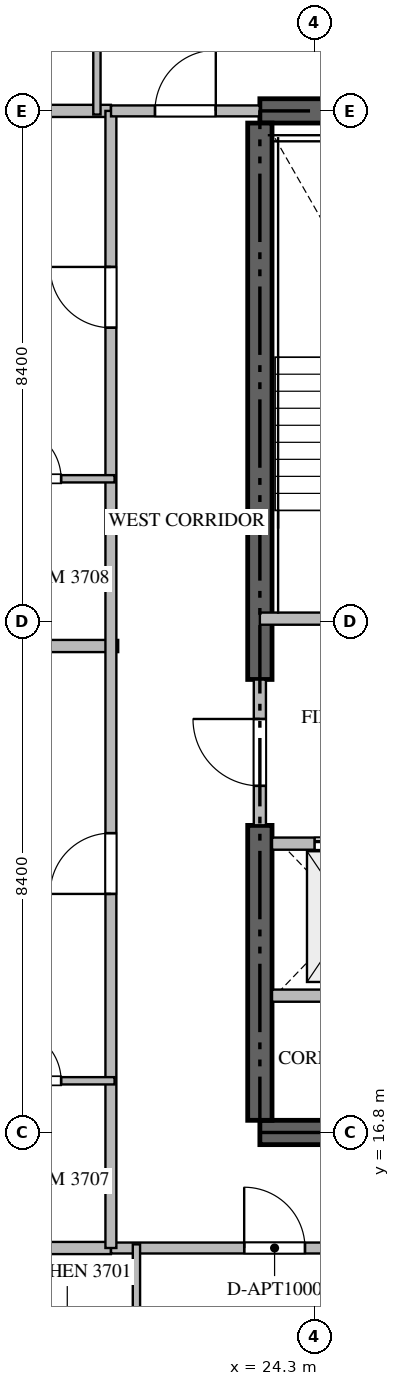
"""IFC4 building model, lengths in metres.
Left out: names, types, materials, properties, quantities, classifications, styles, units other than length and angle.
Written with IfcOpenShell. Run it as: python <this file> out.ifc"""

import sys

from ifc_helpers import new_model, si_unit, direction, frame, frame_2d, origin, place, context, subcontext, project, spatial, rectangle, extrude, source, transform, mapped, element, fill, save


model = new_model("IFC4")
c1 = context("Model", 3, precision=1e-05, world=origin(), true_north=direction((0.0, 1.0)))
c2 = subcontext(c1, "Body", "Model", "MODEL_VIEW")
j1 = project(units=[si_unit("LENGTHUNIT", "METRE"), si_unit("PLANEANGLEUNIT", "RADIAN")], contexts=[c1])
p1 = place(None, origin())
s1 = spatial("IfcSite", under=j1, at=p1, CompositionType="ELEMENT")
p2 = place(p1, origin())
s2 = spatial("IfcBuilding", under=s1, at=p2, CompositionType="ELEMENT")
p3 = place(p2, frame((0.0, 0.0, 150.15)))
s3 = spatial("IfcBuildingStorey", under=s2, at=p3, CompositionType="ELEMENT", Elevation=150.15)
for number, where, z_axis, x_axis in (
    (1, (23.4, 16.8, -0.26), (0.0, 0.0, 1.0), (1.0, 0.0, 0.0)),
    (2, (41.4, 33.6, -0.26), (0.0, 0.0, 1.0), (-1.0, 0.0, 0.0)),
):
    element("IfcWall", number, at=place(p3, frame(where, z_axis=z_axis, x_axis=x_axis)), inside=s3, PredefinedType="SHEAR", context=c2, shape_type="SweptSolid", body=[
        extrude(rectangle(XDim=18.0, YDim=0.4, at=frame_2d((9.0, 0.0))), origin(), (0.0, 0.0, 1.0), 3.748),
    ])
p4 = place(p3, frame((23.4, 17.0, -0.26), z_axis=(0.0, 0.0, 1.0), x_axis=(0.0, 1.0, 0.0)))
e3 = element("IfcWall", 3, at=p4, inside=s3, PredefinedType="SHEAR", context=c2, shape_type="SweptSolid", body=[
    extrude(rectangle(XDim=4.85, YDim=0.4, at=frame_2d((2.425, 0.0))), origin(), (0.0, 0.0, 1.0), 3.748),
])
p5 = place(p3, frame((23.4, 24.25, -0.26), z_axis=(0.0, 0.0, 1.0), x_axis=(0.0, 1.0, 0.0)))
e4 = element("IfcWall", 4, at=p5, inside=s3, PredefinedType="SHEAR", context=c2, shape_type="SweptSolid", body=[
    extrude(rectangle(XDim=9.15, YDim=0.4, at=frame_2d((4.575, 0.0))), origin(), (0.0, 0.0, 1.0), 3.748),
])
p6 = place(p3, frame((23.4, 25.25, 0.0), z_axis=(0.0, 0.0, 1.0), x_axis=(1.0, 0.0, 0.0)))
e5 = element("IfcWall", 5, at=p6, inside=s3, PredefinedType="STANDARD", context=c2, shape_type="SweptSolid", body=[
    extrude(rectangle(XDim=4.45, YDim=0.2, at=frame_2d((2.225, 0.0))), origin(), (0.0, 0.0, 1.0), 3.49),
])
p7 = place(p6, frame((1.65, 0.0, 0.0)))
e6 = element("IfcOpeningElement", 6, at=p7, cuts=e5, PredefinedType="OPENING", context=c2, shape_type="SweptSolid", body=[
    extrude(rectangle(XDim=1.1, YDim=2.15, at=frame_2d((0.55, 1.075))), frame((0.0, 0.11, 0.0), z_axis=(0.0, -1.0, 0.0), x_axis=(1.0, 0.0, 0.0)), (0.0, 0.0, 1.0), 0.22),
])
p8 = place(p3, frame((23.6, 21.55, 0.0), z_axis=(0.0, 0.0, 1.0), x_axis=(1.0, 0.0, 0.0)))
e7 = element("IfcWall", 7, at=p8, inside=s3, PredefinedType="STANDARD", context=c2, shape_type="SweptSolid", body=[
    extrude(rectangle(XDim=2.45, YDim=0.2, at=frame_2d((1.225, 0.0))), origin(), (0.0, 0.0, 1.0), 3.49),
])
p9 = place(p8, frame((0.7, 0.0, 0.0)))
e8 = element("IfcOpeningElement", 8, at=p9, cuts=e7, PredefinedType="OPENING", context=c2, shape_type="SweptSolid", body=[
    extrude(rectangle(XDim=1.2, YDim=2.2, at=frame_2d((0.6, 1.1))), frame((0.0, 0.11, 0.0), z_axis=(0.0, -1.0, 0.0), x_axis=(1.0, 0.0, 0.0)), (0.0, 0.0, 1.0), 0.22),
])
p10 = place(p3, frame((23.6, 19.05, 0.0), z_axis=(0.0, 0.0, 1.0), x_axis=(1.0, 0.0, 0.0)))
e9 = element("IfcWall", 9, at=p10, inside=s3, PredefinedType="STANDARD", context=c2, shape_type="SweptSolid", body=[
    extrude(rectangle(XDim=2.45, YDim=0.2, at=frame_2d((1.225, 0.0))), origin(), (0.0, 0.0, 1.0), 3.49),
])
p11 = place(p3, frame((23.4, 21.852, 0.0), z_axis=(0.0, 0.0, 1.0), x_axis=(0.0, 1.0, 0.0)))
e10 = element("IfcWall", 10, at=p11, inside=s3, PredefinedType="STANDARD", context=c2, shape_type="SweptSolid", body=[
    extrude(rectangle(XDim=2.396, YDim=0.2, at=frame_2d((1.198, 0.0))), origin(), (0.0, 0.0, 1.0), 3.49),
])
p12 = place(p11, frame((0.648, 0.0, 0.0)))
e11 = element("IfcOpeningElement", 11, at=p12, cuts=e10, PredefinedType="OPENING", context=c2, shape_type="SweptSolid", body=[
    extrude(rectangle(XDim=1.1, YDim=2.15, at=frame_2d((0.55, 1.075))), frame((0.0, 0.11, 0.0), z_axis=(0.0, -1.0, 0.0), x_axis=(1.0, 0.0, 0.0)), (0.0, 0.0, 1.0), 0.22),
])
p13 = place(p3, frame((7.882, 24.8, 0.0), z_axis=(0.0, 0.0, 1.0), x_axis=(1.0, 0.0, 0.0)))
e12 = element("IfcWall", 12, at=p13, inside=s3, PredefinedType="PARTITIONING", context=c2, shape_type="SweptSolid", body=[
    extrude(rectangle(XDim=13.188, YDim=0.2, at=frame_2d((6.594, 0.0))), origin(), (0.0, 0.0, 1.0), 3.49),
])
for number, where, z_axis, x_axis in (
    (13, (7.882, 14.9, 0.0), (0.0, 0.0, 1.0), (1.0, 0.0, 0.0)),
    (14, (7.882, 33.6, 0.0), (0.0, 0.0, 1.0), (1.0, 0.0, 0.0)),
):
    element("IfcWall", number, at=place(p3, frame(where, z_axis=z_axis, x_axis=x_axis)), inside=s3, PredefinedType="PARTITIONING", context=c2, shape_type="SweptSolid", body=[
        extrude(rectangle(XDim=13.068, YDim=0.2, at=frame_2d((6.534, 0.0))), origin(), (0.0, 0.0, 1.0), 3.49),
    ])
p14 = place(p3, frame((20.952, 14.9, 0.0), z_axis=(0.0, 0.0, 1.0), x_axis=(1.0, 0.0, 0.0)))
e15 = element("IfcWall", 15, at=p14, inside=s3, PredefinedType="PARTITIONING", context=c2, shape_type="SweptSolid", body=[
    extrude(rectangle(XDim=22.896, YDim=0.18, at=frame_2d((11.448, 0.0))), origin(), (0.0, 0.0, 1.0), 3.49),
])
p15 = place(p14, frame((2.19, 0.0, 0.0)))
e16 = element("IfcOpeningElement", 16, at=p15, cuts=e15, PredefinedType="OPENING", context=c2, shape_type="SweptSolid", body=[
    extrude(rectangle(XDim=1.0, YDim=2.15, at=frame_2d((0.5, 1.075))), frame((0.0, 0.1, 0.0), z_axis=(0.0, -1.0, 0.0), x_axis=(1.0, 0.0, 0.0)), (0.0, 0.0, 1.0), 0.2),
])
p16 = place(p14, frame((5.802, 0.0, 0.0)))
e17 = element("IfcOpeningElement", 17, at=p16, cuts=e15, PredefinedType="OPENING", context=c2, shape_type="SweptSolid", body=[
    extrude(rectangle(XDim=1.0, YDim=2.15, at=frame_2d((0.5, 1.075))), frame((0.0, 0.1, 0.0), z_axis=(0.0, -1.0, 0.0), x_axis=(1.0, 0.0, 0.0)), (0.0, 0.0, 1.0), 0.2),
])
p17 = place(p14, frame((12.196, 0.0, 0.0)))
e18 = element("IfcOpeningElement", 18, at=p17, cuts=e15, PredefinedType="OPENING", context=c2, shape_type="SweptSolid", body=[
    extrude(rectangle(XDim=1.0, YDim=2.15, at=frame_2d((0.5, 1.075))), frame((0.0, 0.1, 0.0), z_axis=(0.0, -1.0, 0.0), x_axis=(1.0, 0.0, 0.0)), (0.0, 0.0, 1.0), 0.2),
])
p18 = place(p14, frame((19.706, 0.0, 0.0)))
e19 = element("IfcOpeningElement", 19, at=p18, cuts=e15, PredefinedType="OPENING", context=c2, shape_type="SweptSolid", body=[
    extrude(rectangle(XDim=1.0, YDim=2.15, at=frame_2d((0.5, 1.075))), frame((0.0, 0.1, 0.0), z_axis=(0.0, -1.0, 0.0), x_axis=(1.0, 0.0, 0.0)), (0.0, 0.0, 1.0), 0.2),
])
p19 = place(p3, frame((20.95, 14.9, 0.0), z_axis=(0.0, 0.0, 1.0), x_axis=(0.0, 1.0, 0.0)))
e20 = element("IfcWall", 20, at=p19, inside=s3, PredefinedType="PARTITIONING", context=c2, shape_type="SweptSolid", body=[
    extrude(rectangle(XDim=18.7, YDim=0.18, at=frame_2d((9.35, 0.0))), origin(), (0.0, 0.0, 1.0), 3.49),
])
p20 = place(p19, frame((5.823, 0.0, 0.0)))
e21 = element("IfcOpeningElement", 21, at=p20, cuts=e20, PredefinedType="OPENING", context=c2, shape_type="SweptSolid", body=[
    extrude(rectangle(XDim=1.0, YDim=2.15, at=frame_2d((0.5, 1.075))), frame((0.0, 0.1, 0.0), z_axis=(0.0, -1.0, 0.0), x_axis=(1.0, 0.0, 0.0)), (0.0, 0.0, 1.0), 0.2),
])
p21 = place(p19, frame((15.134, 0.0, 0.0)))
e22 = element("IfcOpeningElement", 22, at=p21, cuts=e20, PredefinedType="OPENING", context=c2, shape_type="SweptSolid", body=[
    extrude(rectangle(XDim=1.0, YDim=2.15, at=frame_2d((0.5, 1.075))), frame((0.0, 0.1, 0.0), z_axis=(0.0, -1.0, 0.0), x_axis=(1.0, 0.0, 0.0)), (0.0, 0.0, 1.0), 0.2),
])
p22 = place(p3, frame((20.952, 33.6, 0.0), z_axis=(0.0, 0.0, 1.0), x_axis=(1.0, 0.0, 0.0)))
e23 = element("IfcWall", 23, at=p22, inside=s3, PredefinedType="PARTITIONING", context=c2, shape_type="SweptSolid", body=[
    extrude(rectangle(XDim=2.446, YDim=0.18, at=frame_2d((1.223, 0.0))), origin(), (0.0, 0.0, 1.0), 3.49),
])
p23 = place(p22, frame((0.723, 0.0, 0.0)))
e24 = element("IfcOpeningElement", 24, at=p23, cuts=e23, PredefinedType="OPENING", context=c2, shape_type="SweptSolid", body=[
    extrude(rectangle(XDim=1.0, YDim=2.15, at=frame_2d((0.5, 1.075))), frame((0.0, 0.1, 0.0), z_axis=(0.0, -1.0, 0.0), x_axis=(1.0, 0.0, 0.0)), (0.0, 0.0, 1.0), 0.2),
])
for number, where, z_axis, x_axis in (
    (25, (21.37, 12.15, 0.0), (0.0, 0.0, 1.0), (0.0, 1.0, 0.0)),
    (26, (20.72, 36.35, 0.0), (0.0, 0.0, 1.0), (0.0, -1.0, 0.0)),
):
    element("IfcWall", number, at=place(p3, frame(where, z_axis=z_axis, x_axis=x_axis)), inside=s3, PredefinedType="PARTITIONING", context=c2, shape_type="SweptSolid", body=[
        extrude(rectangle(XDim=2.81, YDim=0.12, at=frame_2d((1.405, 0.0))), origin(), (0.0, 0.0, 1.0), 3.49),
    ])
p24 = place(p3, frame((18.402, 17.65, 0.0), z_axis=(0.0, 0.0, 1.0), x_axis=(1.0, 0.0, 0.0)))
e27 = element("IfcWall", 27, at=p24, inside=s3, PredefinedType="PARTITIONING", context=c2, shape_type="SweptSolid", body=[
    extrude(rectangle(XDim=2.608, YDim=0.12, at=frame_2d((1.304, 0.0))), origin(), (0.0, 0.0, 1.0), 3.49),
])
p25 = place(p24, frame((0.879, 0.0, 0.0)))
e28 = element("IfcOpeningElement", 28, at=p25, cuts=e27, PredefinedType="OPENING", context=c2, shape_type="SweptSolid", body=[
    extrude(rectangle(XDim=0.85, YDim=2.1, at=frame_2d((0.425, 1.05))), frame((0.0, 0.07, 0.0), z_axis=(0.0, -1.0, 0.0), x_axis=(1.0, 0.0, 0.0)), (0.0, 0.0, 1.0), 0.14),
])
p26 = place(p3, frame((18.402, 27.55, 0.0), z_axis=(0.0, 0.0, 1.0), x_axis=(1.0, 0.0, 0.0)))
e29 = element("IfcWall", 29, at=p26, inside=s3, PredefinedType="PARTITIONING", context=c2, shape_type="SweptSolid", body=[
    extrude(rectangle(XDim=2.608, YDim=0.12, at=frame_2d((1.304, 0.0))), origin(), (0.0, 0.0, 1.0), 3.49),
])
p27 = place(p26, frame((0.879, 0.0, 0.0)))
e30 = element("IfcOpeningElement", 30, at=p27, cuts=e29, PredefinedType="OPENING", context=c2, shape_type="SweptSolid", body=[
    extrude(rectangle(XDim=0.85, YDim=2.1, at=frame_2d((0.425, 1.05))), frame((0.0, 0.07, 0.0), z_axis=(0.0, -1.0, 0.0), x_axis=(1.0, 0.0, 0.0)), (0.0, 0.0, 1.0), 0.14),
])
m1 = source(origin(), c2, "Body", "SweptSolid", [
    extrude(rectangle(XDim=1.2, YDim=2.2, at=frame_2d((0.6, 1.1))), frame((0.0, 0.025, 0.0), z_axis=(0.0, -1.0, 0.0), x_axis=(1.0, 0.0, 0.0)), (0.0, 0.0, 1.0), 0.05),
])
p28 = place(p9, origin())
e31 = element("IfcDoor", 31, at=p28, inside=s3, OperationType="DOUBLE_DOOR_SLIDING", PredefinedType="DOOR", context=c2, shape_type="MappedRepresentation", body=[
    mapped(m1, transform((0.0, 0.0, 0.0), scale=1.0)),
])
fill(e8, e31)
m2 = source(origin(), c2, "Body", "SweptSolid", [
    extrude(rectangle(XDim=1.1, YDim=2.15, at=frame_2d((0.55, 1.075))), frame((0.0, 0.025, 0.0), z_axis=(0.0, -1.0, 0.0), x_axis=(1.0, 0.0, 0.0)), (0.0, 0.0, 1.0), 0.05),
])
p29 = place(p12, origin())
e32 = element("IfcDoor", 32, at=p29, inside=s3, OperationType="SINGLE_SWING_RIGHT", PredefinedType="DOOR", context=c2, shape_type="MappedRepresentation", body=[
    mapped(m2, transform((0.0, 0.0, 0.0), scale=1.0)),
])
fill(e11, e32)
m3 = source(origin(), c2, "Body", "SweptSolid", [
    extrude(rectangle(XDim=1.0, YDim=2.15, at=frame_2d((0.5, 1.075))), frame((0.0, 0.025, 0.0), z_axis=(0.0, -1.0, 0.0), x_axis=(1.0, 0.0, 0.0)), (0.0, 0.0, 1.0), 0.05),
])
p30 = place(p15, origin())
e33 = element("IfcDoor", 33, at=p30, inside=s3, OperationType="SINGLE_SWING_LEFT", PredefinedType="DOOR", context=c2, shape_type="MappedRepresentation", body=[
    mapped(m3, transform((0.0, 0.0, 0.0), scale=1.0)),
])
fill(e16, e33)
p31 = place(p20, origin())
e34 = element("IfcDoor", 34, at=p31, inside=s3, OperationType="SINGLE_SWING_LEFT", PredefinedType="DOOR", context=c2, shape_type="MappedRepresentation", body=[
    mapped(m3, transform((0.0, 0.0, 0.0), scale=1.0)),
])
fill(e21, e34)
p32 = place(p21, origin())
e35 = element("IfcDoor", 35, at=p32, inside=s3, OperationType="SINGLE_SWING_RIGHT", PredefinedType="DOOR", context=c2, shape_type="MappedRepresentation", body=[
    mapped(m3, transform((0.0, 0.0, 0.0), scale=1.0)),
])
fill(e22, e35)
p33 = place(p23, origin())
e36 = element("IfcDoor", 36, at=p33, inside=s3, OperationType="SINGLE_SWING_RIGHT", PredefinedType="DOOR", context=c2, shape_type="MappedRepresentation", body=[
    mapped(m3, transform((0.0, 0.0, 0.0), scale=1.0)),
])
fill(e24, e36)
m4 = source(origin(), c2, "Body", "SweptSolid", [
    extrude(rectangle(XDim=0.85, YDim=2.1, at=frame_2d((0.425, 1.05))), frame((0.0, 0.025, 0.0), z_axis=(0.0, -1.0, 0.0), x_axis=(1.0, 0.0, 0.0)), (0.0, 0.0, 1.0), 0.05),
])
p34 = place(p25, origin())
e37 = element("IfcDoor", 37, at=p34, inside=s3, OperationType="SINGLE_SWING_LEFT", PredefinedType="DOOR", context=c2, shape_type="MappedRepresentation", body=[
    mapped(m4, transform((0.0, 0.0, 0.0), scale=1.0)),
])
fill(e28, e37)
p35 = place(p27, origin())
e38 = element("IfcDoor", 38, at=p35, inside=s3, OperationType="SINGLE_SWING_LEFT", PredefinedType="DOOR", context=c2, shape_type="MappedRepresentation", body=[
    mapped(m4, transform((0.0, 0.0, 0.0), scale=1.0)),
])
fill(e30, e38)
save(model, sys.argv[1])
